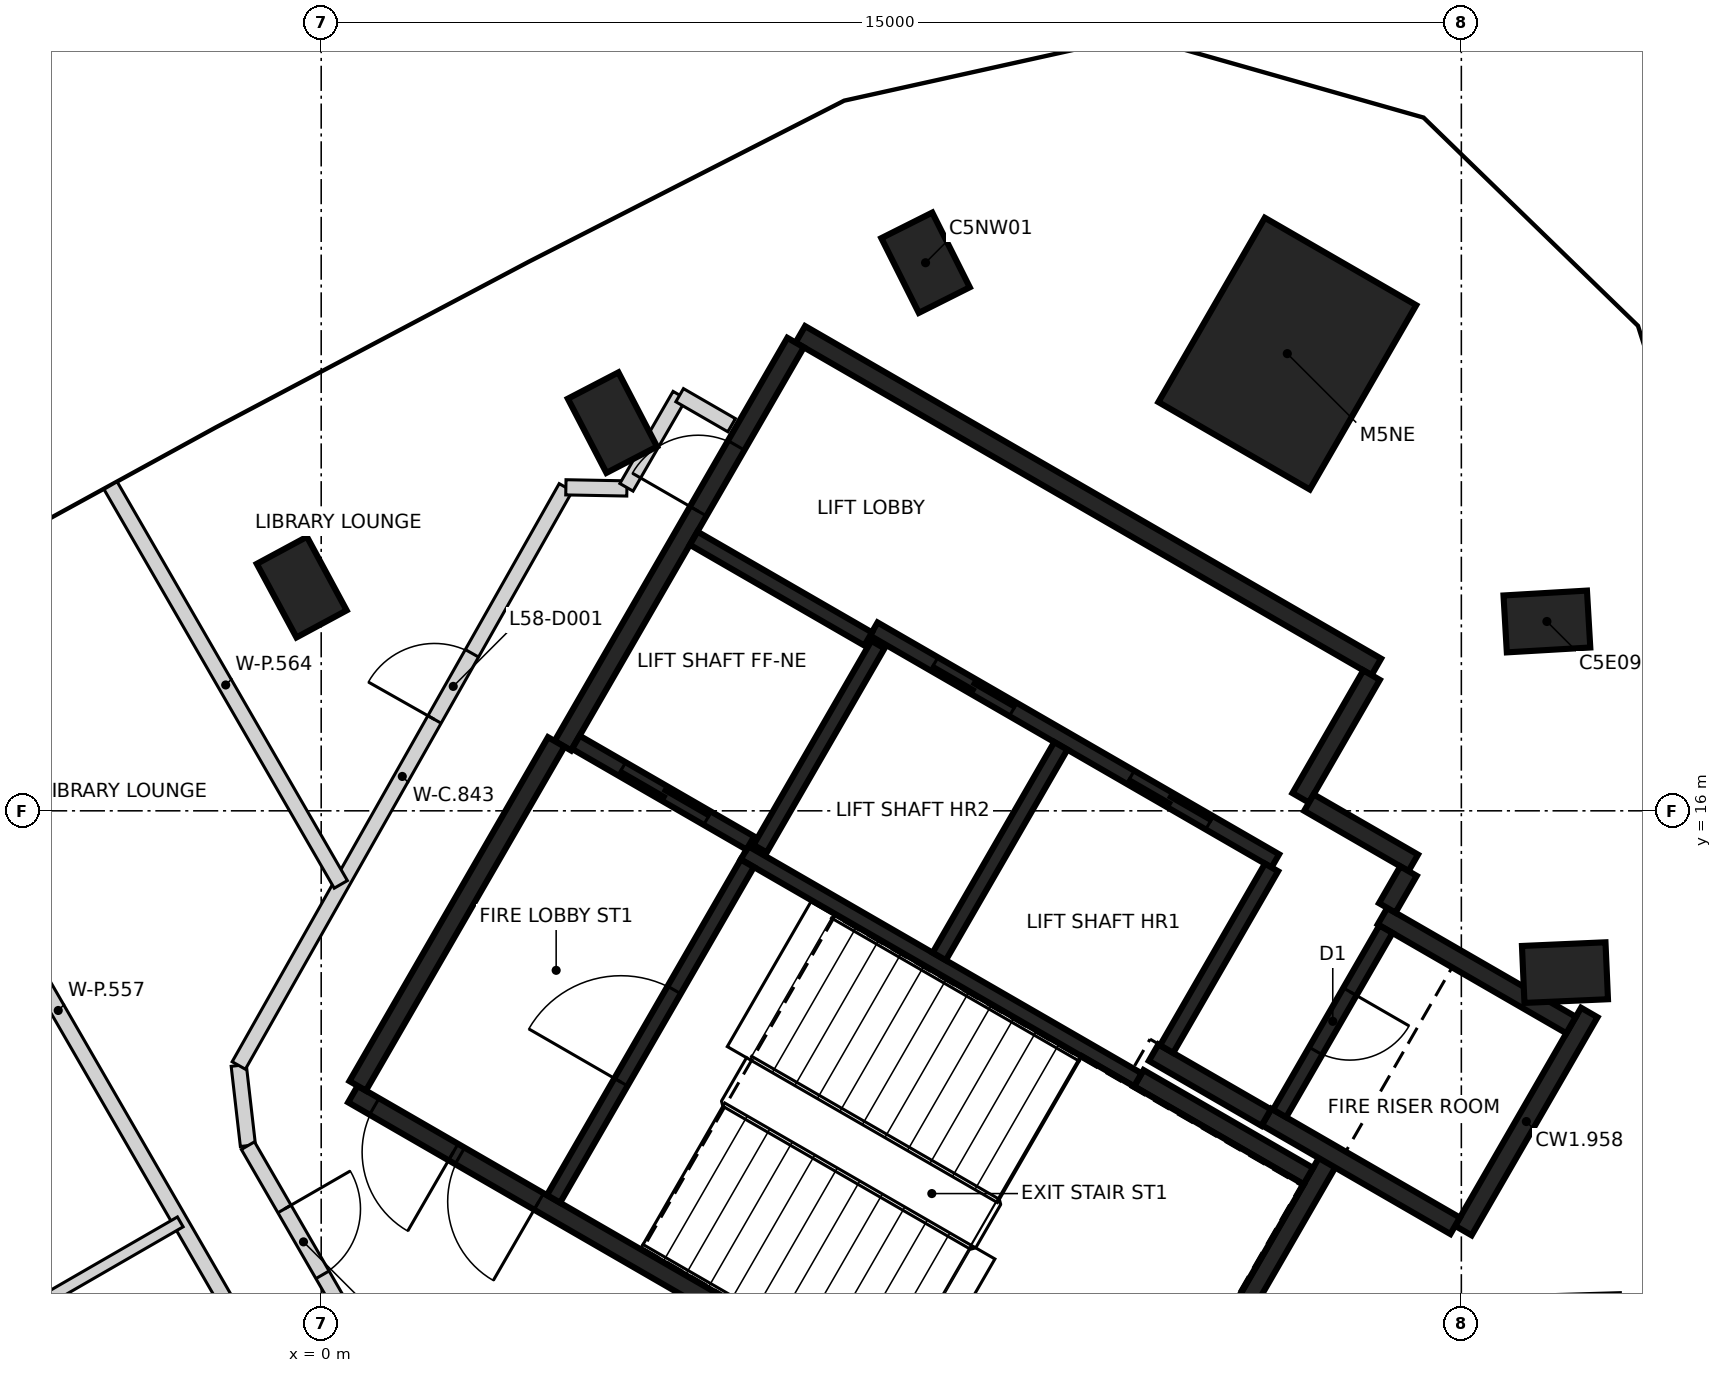
"""IFC4 building model, lengths in metres.
Left out: names, types, materials, properties, quantities, classifications, styles, units other than length and angle.
Written with IfcOpenShell. Run it as: python <this file> out.ifc"""

import sys

from ifc_helpers import new_model, si_unit, direction, frame, frame_2d, origin, origin_2d, place, context, subcontext, project, spatial, rectangle, extrude, element, fill, save


model = new_model("IFC4")
c1 = context("Model", 3, precision=1e-05, world=origin(), true_north=direction((0.0, 1.0)))
c2 = subcontext(c1, "Body", "Model", "MODEL_VIEW")
j1 = project(units=[si_unit("LENGTHUNIT", "METRE"), si_unit("PLANEANGLEUNIT", "RADIAN")], contexts=[c1])
p1 = place(None, origin())
s1 = spatial("IfcSite", under=j1, at=p1, CompositionType="ELEMENT")
p2 = place(p1, origin())
s2 = spatial("IfcBuilding", under=s1, at=p2, CompositionType="ELEMENT")
p3 = place(p2, frame((0.0, 0.0, 232.2)))
s3 = spatial("IfcBuildingStorey", under=s2, at=p3, CompositionType="ELEMENT", Elevation=232.2)
for number, where, z_axis, x_axis in (
    (1, (16.363, 13.872, -0.35), (0.0, 0.0, 1.0), (0.999, 0.044, 0.0)),
    (2, (16.125, 18.491, -0.35), (0.0, 0.0, 1.0), (0.998, 0.058, 0.0)),
    (3, (7.951, 23.211, -0.35), (0.0, 0.0, 1.0), (-0.449, 0.894, 0.0)),
    (4, (3.832, 21.107, -0.35), (0.0, 0.0, 1.0), (-0.461, 0.887, 0.0)),
    (5, (-0.256, 18.943, -0.35), (0.0, 0.0, 1.0), (-0.475, 0.88, 0.0)),
):
    element("IfcColumn", number, at=place(p3, frame(where, z_axis=z_axis, x_axis=x_axis)), inside=s3, PredefinedType="COLUMN", context=c2, shape_type="SweptSolid", body=[
        extrude(rectangle(XDim=1.1, YDim=0.75, at=origin_2d()), origin(), (0.0, 0.0, 1.0), 3.6),
    ])
p4 = place(p3, frame((12.71, 22.015, -0.35), z_axis=(0.0, 0.0, 1.0), x_axis=(0.5, 0.866025403784, 0.0)))
e6 = element("IfcColumn", 6, at=p4, inside=s3, PredefinedType="COLUMN", context=c2, shape_type="SweptSolid", body=[
    extrude(rectangle(XDim=2.8, YDim=2.3, at=origin_2d()), origin(), (0.0, 0.0, 1.0), 3.6),
])
p5 = place(p3, frame((10.42, 6.498, 0.0), z_axis=(0.0, 0.0, 1.0), x_axis=(-0.866021906294, 0.500006057782, 0.0)))
e7 = element("IfcWall", 7, at=p5, inside=s3, PredefinedType="SHEAR", context=c2, shape_type="SweptSolid", body=[
    extrude(rectangle(XDim=11.55, YDim=0.25, at=frame_2d((5.775, 0.0))), origin(), (0.0, 0.0, 1.0), 3.25),
])
p6 = place(p5, frame((10.025, 0.0, 0.0)))
e8 = element("IfcOpeningElement", 8, at=p6, cuts=e7, PredefinedType="OPENING", context=c2, shape_type="SweptSolid", body=[
    extrude(rectangle(XDim=1.2, YDim=2.1, at=frame_2d((0.6, 1.05))), frame((0.0, 0.135, 0.0), z_axis=(0.0, -1.0, 0.0), x_axis=(1.0, 0.0, 0.0)), (0.0, 0.0, 1.0), 0.27),
])
p7 = place(p5, frame((8.725, 0.0, 0.0)))
e9 = element("IfcOpeningElement", 9, at=p7, cuts=e7, PredefinedType="OPENING", context=c2, shape_type="SweptSolid", body=[
    extrude(rectangle(XDim=1.2, YDim=2.1, at=frame_2d((0.6, 1.05))), frame((0.0, 0.135, 0.0), z_axis=(0.0, -1.0, 0.0), x_axis=(1.0, 0.0, 0.0)), (0.0, 0.0, 1.0), 0.27),
])
p8 = place(p3, frame((6.304, 22.269, 0.0), z_axis=(0.0, 0.0, 1.0), x_axis=(0.866022959057, -0.500004234368, 0.0)))
e10 = element("IfcWall", 10, at=p8, inside=s3, PredefinedType="SHEAR", context=c2, shape_type="SweptSolid", body=[
    extrude(rectangle(XDim=8.75, YDim=0.25, at=frame_2d((4.375, 0.0))), origin(), (0.0, 0.0, 1.0), 3.25),
])
p9 = place(p3, frame((3.179, 16.856, 0.0), z_axis=(0.0, 0.0, 1.0), x_axis=(0.500001955336, 0.866024274868, 0.0)))
e11 = element("IfcWall", 11, at=p9, inside=s3, PredefinedType="SHEAR", context=c2, shape_type="SweptSolid", body=[
    extrude(rectangle(XDim=6.125, YDim=0.25, at=frame_2d((3.062, 0.0))), origin(), (0.0, 0.0, 1.0), 3.25),
])
p10 = place(p9, frame((3.563, 0.0, 0.0)))
e12 = element("IfcOpeningElement", 12, at=p10, cuts=e11, PredefinedType="OPENING", context=c2, shape_type="SweptSolid", body=[
    extrude(rectangle(XDim=1.0, YDim=2.1, at=frame_2d((0.5, 1.05))), frame((0.0, 0.135, 0.0), z_axis=(0.0, -1.0, 0.0), x_axis=(1.0, 0.0, 0.0)), (0.0, 0.0, 1.0), 0.27),
])
p11 = place(p3, frame((0.48, 12.381, 0.0), z_axis=(0.0, 0.0, 1.0), x_axis=(0.49999885962, 0.866026062182, 0.0)))
e13 = element("IfcWall", 13, at=p11, inside=s3, PredefinedType="SHEAR", context=c2, shape_type="SweptSolid", body=[
    extrude(rectangle(XDim=5.225, YDim=0.25, at=frame_2d((2.612, 0.0))), origin(), (0.0, 0.0, 1.0), 3.25),
])
p12 = place(p3, frame((13.238, 11.378, 0.0), z_axis=(0.0, 0.0, 1.0), x_axis=(-0.500008851346, -0.866020293397, 0.0)))
e14 = element("IfcWall", 14, at=p12, inside=s3, PredefinedType="SHEAR", context=c2, shape_type="SweptSolid", body=[
    extrude(rectangle(XDim=5.51, YDim=0.25, at=frame_2d((2.755, 0.0))), origin(), (0.0, 0.0, 1.0), 3.25),
])
p13 = place(p3, frame((16.684, 13.347, 0.0), z_axis=(0.0, 0.0, 1.0), x_axis=(-0.499998874531, -0.866026053573, 0.0)))
e15 = element("IfcWall", 15, at=p13, inside=s3, PredefinedType="SHEAR", context=c2, shape_type="SweptSolid", body=[
    extrude(rectangle(XDim=3.313, YDim=0.25, at=frame_2d((1.656, 0.0))), origin(), (0.0, 0.0, 1.0), 3.25),
])
p14 = place(p3, frame((14.918, 10.54, 0.0), z_axis=(0.0, 0.0, 1.0), x_axis=(-0.866063538972, 0.499933942099, 0.0)))
e16 = element("IfcWall", 16, at=p14, inside=s3, PredefinedType="SHEAR", context=c2, shape_type="SweptSolid", body=[
    extrude(rectangle(XDim=2.865, YDim=0.25, at=frame_2d((1.432, 0.0))), origin(), (0.0, 0.0, 1.0), 3.25),
])
p15 = place(p3, frame((13.963, 14.614, 0.0), z_axis=(0.0, 0.0, 1.0), x_axis=(0.866042235819, -0.499970844928, 0.0)))
e17 = element("IfcWall", 17, at=p15, inside=s3, PredefinedType="SHEAR", context=c2, shape_type="SweptSolid", body=[
    extrude(rectangle(XDim=2.865, YDim=0.25, at=frame_2d((1.432, 0.0))), origin(), (0.0, 0.0, 1.0), 3.25),
])
p16 = place(p3, frame((10.757, 12.481, 0.0), z_axis=(0.0, 0.0, 1.0), x_axis=(0.866022940537, -0.500004266446, 0.0)))
e18 = element("IfcWall", 18, at=p16, inside=s3, PredefinedType="SHEAR", context=c2, shape_type="SweptSolid", body=[
    extrude(rectangle(XDim=2.575, YDim=0.25, at=frame_2d((1.287, 0.0))), origin(), (0.0, 0.0, 1.0), 3.25),
])
p17 = place(p3, frame((13.819, 17.785, 0.0), z_axis=(0.0, 0.0, 1.0), x_axis=(-0.500039802285, -0.866002422705, 0.0)))
e19 = element("IfcWall", 19, at=p17, inside=s3, PredefinedType="SHEAR", context=c2, shape_type="SweptSolid", body=[
    extrude(rectangle(XDim=1.865, YDim=0.25, at=frame_2d((0.932, 0.0))), origin(), (0.0, 0.0, 1.0), 3.25),
])
p18 = place(p3, frame((12.433, 11.964, 0.0), z_axis=(0.0, 0.0, 1.0), x_axis=(-0.866038183914, 0.499977863513, 0.0)))
e20 = element("IfcWall", 20, at=p18, inside=s3, PredefinedType="SHEAR", context=c2, shape_type="SweptSolid", body=[
    extrude(rectangle(XDim=1.71, YDim=0.25, at=frame_2d((0.855, 0.0))), origin(), (0.0, 0.0, 1.0), 3.25),
])
p19 = place(p3, frame((12.995, 16.108, 0.0), z_axis=(0.0, 0.0, 1.0), x_axis=(0.866044474677, -0.49996696679, 0.0)))
e21 = element("IfcWall", 21, at=p19, inside=s3, PredefinedType="SHEAR", context=c2, shape_type="SweptSolid", body=[
    extrude(rectangle(XDim=1.584, YDim=0.25, at=frame_2d((0.792, 0.0))), origin(), (0.0, 0.0, 1.0), 3.25),
])
p20 = place(p3, frame((14.305, 15.207, 0.0), z_axis=(0.0, 0.0, 1.0), x_axis=(-0.499848422343, -0.866112899501, 0.0)))
e22 = element("IfcWall", 22, at=p20, inside=s3, PredefinedType="SHEAR", context=c2, shape_type="SweptSolid", body=[
    extrude(rectangle(XDim=0.559, YDim=0.25, at=frame_2d((0.28, 0.0))), origin(), (0.0, 0.0, 1.0), 3.25),
])
p21 = place(p3, frame((12.552, 15.342, 0.0), z_axis=(0.0, 0.0, 1.0), x_axis=(-0.866030299012, 0.499991521122, 0.0)))
e23 = element("IfcWall", 23, at=p21, inside=s3, PredefinedType="SHEAR", context=c2, shape_type="SweptSolid", body=[
    extrude(rectangle(XDim=6.1, YDim=0.2, at=frame_2d((3.05, 0.0))), origin(), (0.0, 0.0, 1.0), 3.25),
])
p22 = place(p21, frame((1.0, 0.0, 0.0)))
e24 = element("IfcOpeningElement", 24, at=p22, cuts=e23, PredefinedType="OPENING", context=c2, shape_type="SweptSolid", body=[
    extrude(rectangle(XDim=1.2, YDim=2.1, at=frame_2d((0.6, 1.05))), frame((0.0, 0.11, 0.0), z_axis=(0.0, -1.0, 0.0), x_axis=(1.0, 0.0, 0.0)), (0.0, 0.0, 1.0), 0.22),
])
p23 = place(p21, frame((3.982, 0.0, 0.0)))
e25 = element("IfcOpeningElement", 25, at=p23, cuts=e23, PredefinedType="OPENING", context=c2, shape_type="SweptSolid", body=[
    extrude(rectangle(XDim=1.2, YDim=2.1, at=frame_2d((0.6, 1.05))), frame((0.0, 0.11, 0.0), z_axis=(0.0, -1.0, 0.0), x_axis=(1.0, 0.0, 0.0)), (0.0, 0.0, 1.0), 0.22),
])
p24 = place(p3, frame((10.743, 12.46, 0.0), z_axis=(0.0, 0.0, 1.0), x_axis=(-0.866018848283, 0.500011354289, 0.0)))
e26 = element("IfcWall", 26, at=p24, inside=s3, PredefinedType="SHEAR", context=c2, shape_type="SweptSolid", body=[
    extrude(rectangle(XDim=5.974, YDim=0.2, at=frame_2d((2.987, 0.0))), origin(), (0.0, 0.0, 1.0), 3.25),
])
p25 = place(p3, frame((3.057, 10.895, 0.0), z_axis=(0.0, 0.0, 1.0), x_axis=(0.500027839223, 0.866009330205, 0.0)))
e27 = element("IfcWall", 27, at=p25, inside=s3, PredefinedType="SHEAR", context=c2, shape_type="SweptSolid", body=[
    extrude(rectangle(XDim=5.098, YDim=0.2, at=frame_2d((2.549, 0.0))), origin(), (0.0, 0.0, 1.0), 3.25),
])
p26 = place(p25, frame((1.774, 0.0, 0.0)))
e28 = element("IfcOpeningElement", 28, at=p26, cuts=e27, PredefinedType="OPENING", context=c2, shape_type="SweptSolid", body=[
    extrude(rectangle(XDim=1.4, YDim=2.1, at=frame_2d((0.7, 1.05))), frame((0.0, 0.11, 0.0), z_axis=(0.0, -1.0, 0.0), x_axis=(1.0, 0.0, 0.0)), (0.0, 0.0, 1.0), 0.22),
])
p27 = place(p3, frame((8.132, 14.084, 0.0), z_axis=(0.0, 0.0, 1.0), x_axis=(0.500030834389, 0.86600760081, 0.0)))
e29 = element("IfcWall", 29, at=p27, inside=s3, PredefinedType="SHEAR", context=c2, shape_type="SweptSolid", body=[
    extrude(rectangle(XDim=3.198, YDim=0.2, at=frame_2d((1.599, 0.0))), origin(), (0.0, 0.0, 1.0), 3.25),
])
p28 = place(p3, frame((14.008, 14.442, 0.0), z_axis=(0.0, 0.0, 1.0), x_axis=(-0.499986818241, -0.866033014143, 0.0)))
e30 = element("IfcWall", 30, at=p28, inside=s3, PredefinedType="SHEAR", context=c2, shape_type="SweptSolid", body=[
    extrude(rectangle(XDim=2.798, YDim=0.2, at=frame_2d((1.399, 0.0))), origin(), (0.0, 0.0, 1.0), 3.25),
])
p29 = place(p28, frame((0.949, 0.0, 0.0)))
e31 = element("IfcOpeningElement", 31, at=p29, cuts=e30, PredefinedType="OPENING", context=c2, shape_type="SweptSolid", body=[
    extrude(rectangle(XDim=0.9, YDim=2.1, at=frame_2d((0.45, 1.05))), frame((0.0, 0.11, 0.0), z_axis=(0.0, -1.0, 0.0), x_axis=(1.0, 0.0, 0.0)), (0.0, 0.0, 1.0), 0.22),
])
p30 = place(p3, frame((12.502, 15.255, 0.0), z_axis=(0.0, 0.0, 1.0), x_axis=(-0.499965018551, -0.866045599391, 0.0)))
e32 = element("IfcWall", 32, at=p30, inside=s3, PredefinedType="SHEAR", context=c2, shape_type="SweptSolid", body=[
    extrude(rectangle(XDim=2.759, YDim=0.2, at=frame_2d((1.379, 0.0))), origin(), (0.0, 0.0, 1.0), 3.25),
])
p31 = place(p3, frame((7.324, 18.187, 0.0), z_axis=(0.0, 0.0, 1.0), x_axis=(-0.499967891604, -0.866043940782, 0.0)))
e33 = element("IfcWall", 33, at=p31, inside=s3, PredefinedType="SHEAR", context=c2, shape_type="SweptSolid", body=[
    extrude(rectangle(XDim=3.1, YDim=0.2, at=frame_2d((1.55, 0.0))), origin(), (0.0, 0.0, 1.0), 3.25),
])
p32 = place(p3, frame((5.646, 15.576, 0.0), z_axis=(0.0, 0.0, 1.0), x_axis=(-0.866018407898, 0.500012117035, 0.0)))
e34 = element("IfcWall", 34, at=p32, inside=s3, PredefinedType="SHEAR", context=c2, shape_type="SweptSolid", body=[
    extrude(rectangle(XDim=2.651, YDim=0.2, at=frame_2d((1.325, 0.0))), origin(), (0.0, 0.0, 1.0), 3.25),
])
p33 = place(p32, frame((0.652, 0.0, 0.0)))
e35 = element("IfcOpeningElement", 35, at=p33, cuts=e34, PredefinedType="OPENING", context=c2, shape_type="SweptSolid", body=[
    extrude(rectangle(XDim=1.3, YDim=2.1, at=frame_2d((0.65, 1.05))), frame((0.0, 0.11, 0.0), z_axis=(0.0, -1.0, 0.0), x_axis=(1.0, 0.0, 0.0)), (0.0, 0.0, 1.0), 0.22),
])
p34 = place(p3, frame((7.196, 18.26, 0.0), z_axis=(0.0, 0.0, 1.0), x_axis=(-0.866018407898, 0.500012117035, 0.0)))
e36 = element("IfcWall", 36, at=p34, inside=s3, PredefinedType="SHEAR", context=c2, shape_type="SweptSolid", body=[
    extrude(rectangle(XDim=2.651, YDim=0.2, at=frame_2d((1.325, 0.0))), origin(), (0.0, 0.0, 1.0), 3.25),
])
p35 = place(p3, frame((-1.085, 12.65, 0.0), z_axis=(0.0, 0.0, 1.0), x_axis=(0.113812454263, -0.993502252264, 0.0)))
e37 = element("IfcWall", 37, at=p35, inside=s3, PredefinedType="PARTITIONING", context=c2, shape_type="SweptSolid", body=[
    extrude(rectangle(XDim=1.062, YDim=0.2, at=frame_2d((0.531, 0.0))), origin(), (0.0, 0.0, 1.0), 3.25),
])
p36 = place(p3, frame((-1.084, 12.65, 0.0), z_axis=(0.0, 0.0, 1.0), x_axis=(0.492373019537, 0.87038428848, 0.0)))
e38 = element("IfcWall", 38, at=p36, inside=s3, PredefinedType="PARTITIONING", context=c2, shape_type="SweptSolid", body=[
    extrude(rectangle(XDim=8.738, YDim=0.2, at=frame_2d((4.369, 0.0))), origin(), (0.0, 0.0, 1.0), 3.25),
])
p37 = place(p36, frame((5.23, 0.0, 0.0)))
e39 = element("IfcOpeningElement", 39, at=p37, cuts=e38, PredefinedType="OPENING", context=c2, shape_type="SweptSolid", body=[
    extrude(rectangle(XDim=1.0, YDim=2.1, at=frame_2d((0.5, 1.05))), frame((0.0, 0.11, 0.0), z_axis=(0.0, -1.0, 0.0), x_axis=(1.0, 0.0, 0.0)), (0.0, 0.0, 1.0), 0.22),
])
p38 = place(p3, frame((-0.964, 11.595, 0.0), z_axis=(0.0, 0.0, 1.0), x_axis=(0.500081432713, -0.865978383481, 0.0)))
e40 = element("IfcWall", 40, at=p38, inside=s3, PredefinedType="PARTITIONING", context=c2, shape_type="SweptSolid", body=[
    extrude(rectangle(XDim=2.924, YDim=0.2, at=frame_2d((1.462, 0.0))), origin(), (0.0, 0.0, 1.0), 3.25),
])
p39 = place(p38, frame((0.962, 0.0, 0.0)))
e41 = element("IfcOpeningElement", 41, at=p39, cuts=e40, PredefinedType="OPENING", context=c2, shape_type="SweptSolid", body=[
    extrude(rectangle(XDim=1.0, YDim=2.1, at=frame_2d((0.5, 1.05))), frame((0.0, 0.11, 0.0), z_axis=(0.0, -1.0, 0.0), x_axis=(1.0, 0.0, 0.0)), (0.0, 0.0, 1.0), 0.22),
])
p40 = place(p3, frame((3.219, 20.256, 0.0), z_axis=(0.0, 0.0, 1.0), x_axis=(0.99982237262, -0.0188473661, 0.0)))
e42 = element("IfcWall", 42, at=p40, inside=s3, PredefinedType="PARTITIONING", context=c2, shape_type="SweptSolid", body=[
    extrude(rectangle(XDim=0.803, YDim=0.2, at=frame_2d((0.402, 0.0))), origin(), (0.0, 0.0, 1.0), 3.25),
])
p41 = place(p3, frame((4.016, 20.256, 0.0), z_axis=(0.0, 0.0, 1.0), x_axis=(0.500135180047, 0.865947343479, 0.0)))
e43 = element("IfcWall", 43, at=p41, inside=s3, PredefinedType="PARTITIONING", context=c2, shape_type="SweptSolid", body=[
    extrude(rectangle(XDim=1.399, YDim=0.2, at=frame_2d((0.7, 0.0))), origin(), (0.0, 0.0, 1.0), 2.35),
])
p42 = place(p3, frame((4.716, 21.468, 0.0), z_axis=(0.0, 0.0, 1.0), x_axis=(0.865912682783, -0.500195187698, 0.0)))
e44 = element("IfcWall", 44, at=p42, inside=s3, PredefinedType="PARTITIONING", context=c2, shape_type="SweptSolid", body=[
    extrude(rectangle(XDim=0.79, YDim=0.2, at=frame_2d((0.395, 0.0))), origin(), (0.0, 0.0, 1.0), 2.35),
])
p43 = place(p3, frame((-6.315, 18.32, 0.0), z_axis=(0.0, 0.0, 1.0), x_axis=(0.500012296027, -0.866018304553, 0.0)))
e45 = element("IfcWall", 45, at=p43, inside=s3, PredefinedType="PARTITIONING", context=c2, shape_type="SweptSolid", body=[
    extrude(rectangle(XDim=11.423, YDim=0.2, at=frame_2d((5.711, 0.0))), origin(), (0.0, 0.0, 1.0), 2.35),
])
p44 = place(p3, frame((-2.771, 20.279, 0.0), z_axis=(0.0, 0.0, 1.0), x_axis=(0.499939878606, -0.866060112105, 0.0)))
e46 = element("IfcWall", 46, at=p44, inside=s3, PredefinedType="PARTITIONING", context=c2, shape_type="SweptSolid", body=[
    extrude(rectangle(XDim=6.059, YDim=0.2, at=frame_2d((3.029, 0.0))), origin(), (0.0, 0.0, 1.0), 2.35),
])
p45 = place(p3, frame((-3.664, 9.547, 0.0), z_axis=(0.0, 0.0, 1.0), x_axis=(0.866049423672, 0.499958394027, 0.0)))
e47 = element("IfcWall", 47, at=p45, inside=s3, PredefinedType="PARTITIONING", context=c2, shape_type="SweptSolid", body=[
    extrude(rectangle(XDim=2.09, YDim=0.15, at=frame_2d((1.045, 0.0))), origin(), (0.0, 0.0, 1.0), 3.25),
])
p46 = place(p33, origin())
e48 = element("IfcDoor", 48, at=p46, inside=s3, OperationType="SLIDING_TO_RIGHT", PredefinedType="DOOR", context=c2, shape_type="SweptSolid", body=[
    extrude(rectangle(XDim=1.3, YDim=2.1, at=frame_2d((0.65, 1.05))), frame((0.0, 0.025, 0.0), z_axis=(0.0, -1.0, 0.0), x_axis=(1.0, 0.0, 0.0)), (0.0, 0.0, 1.0), 0.05),
])
fill(e35, e48)
p47 = place(p22, origin())
e49 = element("IfcDoor", 49, at=p47, inside=s3, OperationType="DOUBLE_DOOR_SLIDING", PredefinedType="DOOR", context=c2, shape_type="SweptSolid", body=[
    extrude(rectangle(XDim=1.2, YDim=2.1, at=frame_2d((0.6, 1.05))), frame((0.0, 0.025, 0.0), z_axis=(0.0, -1.0, 0.0), x_axis=(1.0, 0.0, 0.0)), (0.0, 0.0, 1.0), 0.05),
])
fill(e24, e49)
p48 = place(p23, origin())
e50 = element("IfcDoor", 50, at=p48, inside=s3, OperationType="DOUBLE_DOOR_SLIDING", PredefinedType="DOOR", context=c2, shape_type="SweptSolid", body=[
    extrude(rectangle(XDim=1.2, YDim=2.1, at=frame_2d((0.6, 1.05))), frame((0.0, 0.025, 0.0), z_axis=(0.0, -1.0, 0.0), x_axis=(1.0, 0.0, 0.0)), (0.0, 0.0, 1.0), 0.05),
])
fill(e25, e50)
p49 = place(p10, origin())
e51 = element("IfcDoor", 51, at=p49, inside=s3, OperationType="SINGLE_SWING_LEFT", PredefinedType="DOOR", context=c2, shape_type="SweptSolid", body=[
    extrude(rectangle(XDim=1.0, YDim=2.1, at=frame_2d((0.5, 1.05))), frame((0.0, 0.025, 0.0), z_axis=(0.0, -1.0, 0.0), x_axis=(1.0, 0.0, 0.0)), (0.0, 0.0, 1.0), 0.05),
])
fill(e12, e51)
p50 = place(p6, origin())
e52 = element("IfcDoor", 52, at=p50, inside=s3, OperationType="SINGLE_SWING_LEFT", PredefinedType="DOOR", context=c2, shape_type="SweptSolid", body=[
    extrude(rectangle(XDim=1.2, YDim=2.1, at=frame_2d((0.6, 1.05))), frame((0.0, 0.025, 0.0), z_axis=(0.0, -1.0, 0.0), x_axis=(1.0, 0.0, 0.0)), (0.0, 0.0, 1.0), 0.05),
])
fill(e8, e52)
p51 = place(p7, origin())
e53 = element("IfcDoor", 53, at=p51, inside=s3, OperationType="SINGLE_SWING_RIGHT", PredefinedType="DOOR", context=c2, shape_type="SweptSolid", body=[
    extrude(rectangle(XDim=1.2, YDim=2.1, at=frame_2d((0.6, 1.05))), frame((0.0, 0.025, 0.0), z_axis=(0.0, -1.0, 0.0), x_axis=(1.0, 0.0, 0.0)), (0.0, 0.0, 1.0), 0.05),
])
fill(e9, e53)
p52 = place(p26, origin())
e54 = element("IfcDoor", 54, at=p52, inside=s3, OperationType="SINGLE_SWING_RIGHT", PredefinedType="DOOR", context=c2, shape_type="SweptSolid", body=[
    extrude(rectangle(XDim=1.4, YDim=2.1, at=frame_2d((0.7, 1.05))), frame((0.0, 0.025, 0.0), z_axis=(0.0, -1.0, 0.0), x_axis=(1.0, 0.0, 0.0)), (0.0, 0.0, 1.0), 0.05),
])
fill(e28, e54)
p53 = place(p29, origin())
e55 = element("IfcDoor", 55, at=p53, inside=s3, OperationType="SINGLE_SWING_LEFT", PredefinedType="DOOR", context=c2, shape_type="SweptSolid", body=[
    extrude(rectangle(XDim=0.9, YDim=2.1, at=frame_2d((0.45, 1.05))), frame((0.0, 0.025, 0.0), z_axis=(0.0, -1.0, 0.0), x_axis=(1.0, 0.0, 0.0)), (0.0, 0.0, 1.0), 0.05),
])
fill(e31, e55)
p54 = place(p37, origin())
e56 = element("IfcDoor", 56, at=p54, inside=s3, OperationType="SINGLE_SWING_LEFT", PredefinedType="DOOR", context=c2, shape_type="SweptSolid", body=[
    extrude(rectangle(XDim=1.0, YDim=2.1, at=frame_2d((0.5, 1.05))), frame((0.0, 0.025, 0.0), z_axis=(0.0, -1.0, 0.0), x_axis=(1.0, 0.0, 0.0)), (0.0, 0.0, 1.0), 0.05),
])
fill(e39, e56)
p55 = place(p39, origin())
e57 = element("IfcDoor", 57, at=p55, inside=s3, OperationType="SINGLE_SWING_LEFT", PredefinedType="DOOR", context=c2, shape_type="SweptSolid", body=[
    extrude(rectangle(XDim=1.0, YDim=2.1, at=frame_2d((0.5, 1.05))), frame((0.0, 0.025, 0.0), z_axis=(0.0, -1.0, 0.0), x_axis=(1.0, 0.0, 0.0)), (0.0, 0.0, 1.0), 0.05),
])
fill(e41, e57)
save(model, sys.argv[1])
